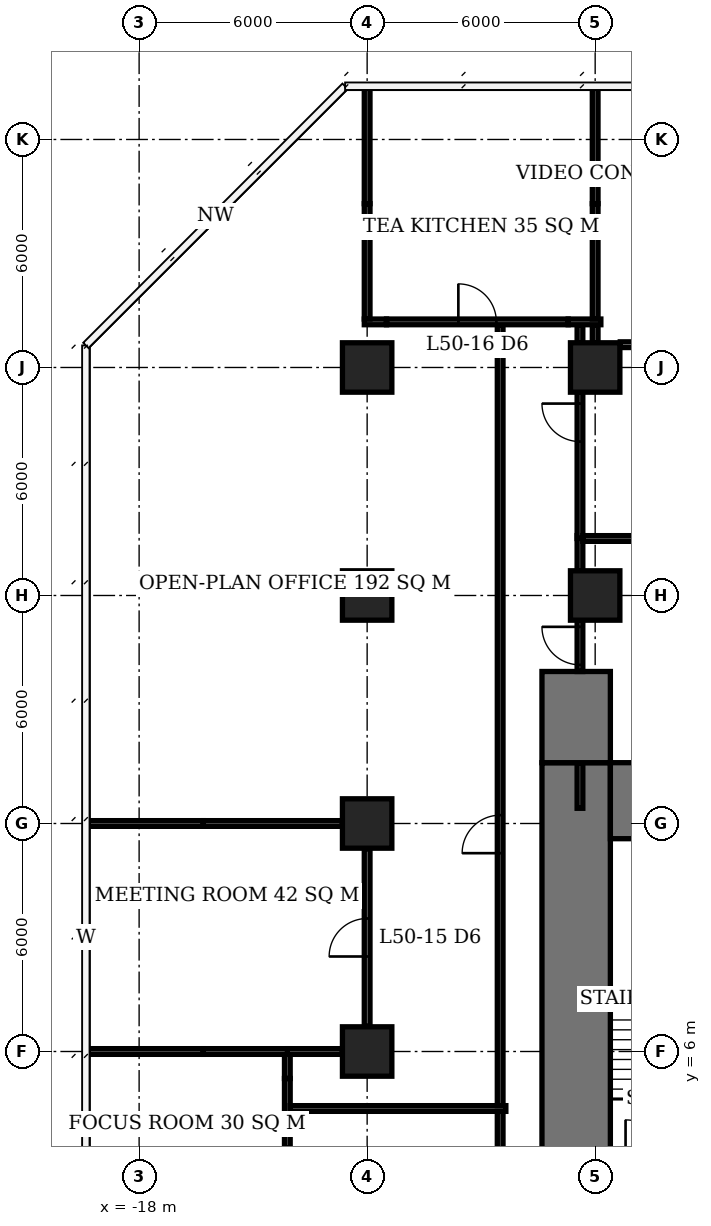
"""IFC4 building model, lengths in metres.
Left out: names, types, materials, properties, quantities, classifications, styles, units other than length and angle.
Written with IfcOpenShell. Run it as: python <this file> out.ifc"""

import sys

from ifc_helpers import new_model, si_unit, direction, frame, frame_2d, origin, origin_2d, place, context, subcontext, project, spatial, rectangle, extrude, element, fill, save


model = new_model("IFC4")
c1 = context("Model", 3, precision=1e-05, world=origin(), true_north=direction((0.0, 1.0)))
c2 = subcontext(c1, "Body", "Model", "MODEL_VIEW")
j1 = project(units=[si_unit("LENGTHUNIT", "METRE"), si_unit("PLANEANGLEUNIT", "RADIAN")], contexts=[c1])
p1 = place(None, origin())
s1 = spatial("IfcSite", under=j1, at=p1, CompositionType="ELEMENT")
p2 = place(p1, origin())
s2 = spatial("IfcBuilding", under=s1, at=p2, CompositionType="ELEMENT")
p3 = place(p2, frame((0.0, 0.0, 204.5)))
s3 = spatial("IfcBuildingStorey", under=s2, at=p3, CompositionType="ELEMENT", Elevation=204.5)
for number, where, z_axis, x_axis in (
    (1, (-12.0, 6.0, 0.0), (0.0, 0.0, 1.0), (1.0, 0.0, 0.0)),
    (2, (-12.0, 12.0, 0.0), (0.0, 0.0, 1.0), (1.0, 0.0, 0.0)),
    (3, (-12.0, 18.0, 0.0), (0.0, 0.0, 1.0), (1.0, 0.0, 0.0)),
    (4, (-12.0, 24.0, 0.0), (0.0, 0.0, 1.0), (1.0, 0.0, 0.0)),
    (5, (-6.0, 18.0, 0.0), (0.0, 0.0, 1.0), (1.0, 0.0, 0.0)),
    (6, (-6.0, 24.0, 0.0), (0.0, 0.0, 1.0), (1.0, 0.0, 0.0)),
):
    element("IfcColumn", number, at=place(p3, frame(where, z_axis=z_axis, x_axis=x_axis)), inside=s3, PredefinedType="COLUMN", context=c2, shape_type="SweptSolid", body=[
        extrude(rectangle(XDim=1.3, YDim=1.3, at=origin_2d()), origin(), (0.0, 0.0, 1.0), 3.9),
    ])
p4 = place(p3, frame((-5.6, 12.6, 0.0), z_axis=(0.0, 0.0, 1.0), x_axis=(1.0, 0.0, 0.0)))
e7 = element("IfcWall", 7, at=p4, inside=s3, PredefinedType="SHEAR", context=c2, shape_type="SweptSolid", body=[
    extrude(rectangle(XDim=23.2, YDim=2.0, at=frame_2d((11.6, 0.0))), origin(), (0.0, 0.0, 1.0), 3.9),
])
p5 = place(p3, frame((-6.5, -7.6, 0.0), z_axis=(0.0, 0.0, 1.0), x_axis=(0.0, 1.0, 0.0)))
e8 = element("IfcWall", 8, at=p5, inside=s3, PredefinedType="SHEAR", context=c2, shape_type="SweptSolid", body=[
    extrude(rectangle(XDim=21.2, YDim=1.8, at=frame_2d((10.6, 0.0))), origin(), (0.0, 0.0, 1.0), 3.9),
])
p6 = place(p5, frame((7.8, 0.0, 0.0)))
e9 = element("IfcOpeningElement", 9, at=p6, cuts=e8, PredefinedType="OPENING", context=c2, shape_type="SweptSolid", body=[
    extrude(rectangle(XDim=1.8, YDim=2.4, at=frame_2d((0.9, 1.2))), frame((0.0, 0.91, 0.0), z_axis=(0.0, -1.0, 0.0), x_axis=(1.0, 0.0, 0.0)), (0.0, 0.0, 1.0), 1.82),
])
p7 = place(p3, frame((-6.5, 13.6, 0.0), z_axis=(0.0, 0.0, 1.0), x_axis=(0.0, 1.0, 0.0)))
e10 = element("IfcWall", 10, at=p7, inside=s3, PredefinedType="SHEAR", context=c2, shape_type="SweptSolid", body=[
    extrude(rectangle(XDim=2.4, YDim=1.8, at=frame_2d((1.2, 0.0))), origin(), (0.0, 0.0, 1.0), 3.9),
])
p8 = place(p3, frame((-19.35, 6.0, 0.0), z_axis=(0.0, 0.0, 1.0), x_axis=(1.0, 0.0, 0.0)))
e11 = element("IfcWall", 11, at=p8, inside=s3, PredefinedType="PARTITIONING", context=c2, shape_type="SweptSolid", body=[
    extrude(rectangle(XDim=3.04, YDim=0.15, at=frame_2d((1.52, 0.0))), origin(), (0.0, 0.0, 1.0), 3.65),
])
p9 = place(p3, frame((-16.31, 6.0, 0.0), z_axis=(0.0, 0.0, 1.0), x_axis=(1.0, 0.0, 0.0)))
e12 = element("IfcWall", 12, at=p9, inside=s3, PredefinedType="PARTITIONING", context=c2, shape_type="SweptSolid", body=[
    extrude(rectangle(XDim=2.285, YDim=0.15, at=frame_2d((1.143, 0.0))), origin(), (0.0, 0.0, 1.0), 2.65),
])
p10 = place(p3, frame((-14.1, 6.0, 0.0), z_axis=(0.0, 0.0, 1.0), x_axis=(1.0, 0.0, 0.0)))
e13 = element("IfcWall", 13, at=p10, inside=s3, PredefinedType="PARTITIONING", context=c2, shape_type="SweptSolid", body=[
    extrude(rectangle(XDim=1.45, YDim=0.15, at=frame_2d((0.725, 0.0))), origin(), (0.0, 0.0, 1.0), 2.65),
])
p11 = place(p3, frame((-19.35, 12.0, 0.0), z_axis=(0.0, 0.0, 1.0), x_axis=(1.0, 0.0, 0.0)))
e14 = element("IfcWall", 14, at=p11, inside=s3, PredefinedType="PARTITIONING", context=c2, shape_type="SweptSolid", body=[
    extrude(rectangle(XDim=3.04, YDim=0.15, at=frame_2d((1.52, 0.0))), origin(), (0.0, 0.0, 1.0), 3.65),
])
p12 = place(p3, frame((-16.31, 12.0, 0.0), z_axis=(0.0, 0.0, 1.0), x_axis=(1.0, 0.0, 0.0)))
e15 = element("IfcWall", 15, at=p12, inside=s3, PredefinedType="PARTITIONING", context=c2, shape_type="SweptSolid", body=[
    extrude(rectangle(XDim=3.66, YDim=0.15, at=frame_2d((1.83, 0.0))), origin(), (0.0, 0.0, 1.0), 2.65),
])
p13 = place(p3, frame((-5.34, 24.6, 0.0), z_axis=(0.0, 0.0, 1.0), x_axis=(1.0, 0.0, 0.0)))
e16 = element("IfcWall", 16, at=p13, inside=s3, PredefinedType="PARTITIONING", context=c2, shape_type="SweptSolid", body=[
    extrude(rectangle(XDim=4.68, YDim=0.15, at=frame_2d((2.34, 0.0))), origin(), (0.0, 0.0, 1.0), 3.65),
])
p14 = place(p13, frame((1.84, 0.0, 0.0)))
e17 = element("IfcOpeningElement", 17, at=p14, cuts=e16, PredefinedType="OPENING", context=c2, shape_type="SweptSolid", body=[
    extrude(rectangle(XDim=1.0, YDim=2.1, at=frame_2d((0.5, 1.05))), frame((0.0, 0.085, 0.0), z_axis=(0.0, -1.0, 0.0), x_axis=(1.0, 0.0, 0.0)), (0.0, 0.0, 1.0), 0.17),
])
p15 = place(p3, frame((-12.075, 25.2, 0.0), z_axis=(0.0, 0.0, 1.0), x_axis=(1.0, 0.0, 0.0)))
e18 = element("IfcWall", 18, at=p15, inside=s3, PredefinedType="PARTITIONING", context=c2, shape_type="SweptSolid", body=[
    extrude(rectangle(XDim=0.585, YDim=0.15, at=frame_2d((0.292, 0.0))), origin(), (0.0, 0.0, 1.0), 2.65),
])
p16 = place(p3, frame((-11.49, 25.2, 0.0), z_axis=(0.0, 0.0, 1.0), x_axis=(1.0, 0.0, 0.0)))
e19 = element("IfcWall", 19, at=p16, inside=s3, PredefinedType="PARTITIONING", context=c2, shape_type="SweptSolid", body=[
    extrude(rectangle(XDim=4.78, YDim=0.15, at=frame_2d((2.39, 0.0))), origin(), (0.0, 0.0, 1.0), 3.65),
])
p17 = place(p16, frame((1.89, 0.0, 0.0)))
e20 = element("IfcOpeningElement", 20, at=p17, cuts=e19, PredefinedType="OPENING", context=c2, shape_type="SweptSolid", body=[
    extrude(rectangle(XDim=1.0, YDim=2.1, at=frame_2d((0.5, 1.05))), frame((0.0, 0.085, 0.0), z_axis=(0.0, -1.0, 0.0), x_axis=(1.0, 0.0, 0.0)), (0.0, 0.0, 1.0), 0.17),
])
p18 = place(p3, frame((-6.71, 25.2, 0.0), z_axis=(0.0, 0.0, 1.0), x_axis=(1.0, 0.0, 0.0)))
e21 = element("IfcWall", 21, at=p18, inside=s3, PredefinedType="PARTITIONING", context=c2, shape_type="SweptSolid", body=[
    extrude(rectangle(XDim=0.86, YDim=0.15, at=frame_2d((0.43, 0.0))), origin(), (0.0, 0.0, 1.0), 2.65),
])
p19 = place(p3, frame((-14.1, 0.71, 0.0), z_axis=(0.0, 0.0, 1.0), x_axis=(0.0, 1.0, 0.0)))
e22 = element("IfcWall", 22, at=p19, inside=s3, PredefinedType="PARTITIONING", context=c2, shape_type="SweptSolid", body=[
    extrude(rectangle(XDim=4.58, YDim=0.15, at=frame_2d((2.29, 0.0))), origin(), (0.0, 0.0, 1.0), 3.65),
])
p20 = place(p19, frame((1.79, 0.0, 0.0)))
e23 = element("IfcOpeningElement", 23, at=p20, cuts=e22, PredefinedType="OPENING", context=c2, shape_type="SweptSolid", body=[
    extrude(rectangle(XDim=1.0, YDim=2.1, at=frame_2d((0.5, 1.05))), frame((0.0, 0.085, 0.0), z_axis=(0.0, -1.0, 0.0), x_axis=(1.0, 0.0, 0.0)), (0.0, 0.0, 1.0), 0.17),
])
p21 = place(p3, frame((-14.1, 5.29, 0.0), z_axis=(0.0, 0.0, 1.0), x_axis=(0.0, 1.0, 0.0)))
e24 = element("IfcWall", 24, at=p21, inside=s3, PredefinedType="PARTITIONING", context=c2, shape_type="SweptSolid", body=[
    extrude(rectangle(XDim=0.635, YDim=0.15, at=frame_2d((0.317, 0.0))), origin(), (0.0, 0.0, 1.0), 2.65),
])
p22 = place(p3, frame((-12.0, 6.66, 0.0), z_axis=(0.0, 0.0, 1.0), x_axis=(0.0, 1.0, 0.0)))
e25 = element("IfcWall", 25, at=p22, inside=s3, PredefinedType="PARTITIONING", context=c2, shape_type="SweptSolid", body=[
    extrude(rectangle(XDim=4.68, YDim=0.15, at=frame_2d((2.34, 0.0))), origin(), (0.0, 0.0, 1.0), 3.65),
])
p23 = place(p22, frame((1.84, 0.0, 0.0)))
e26 = element("IfcOpeningElement", 26, at=p23, cuts=e25, PredefinedType="OPENING", context=c2, shape_type="SweptSolid", body=[
    extrude(rectangle(XDim=1.0, YDim=2.1, at=frame_2d((0.5, 1.05))), frame((0.0, 0.085, 0.0), z_axis=(0.0, -1.0, 0.0), x_axis=(1.0, 0.0, 0.0)), (0.0, 0.0, 1.0), 0.17),
])
p24 = place(p3, frame((-12.0, 25.275, 0.0), z_axis=(0.0, 0.0, 1.0), x_axis=(0.0, 1.0, 0.0)))
e27 = element("IfcWall", 27, at=p24, inside=s3, PredefinedType="PARTITIONING", context=c2, shape_type="SweptSolid", body=[
    extrude(rectangle(XDim=3.035, YDim=0.15, at=frame_2d((1.518, 0.0))), origin(), (0.0, 0.0, 1.0), 2.65),
])
p25 = place(p3, frame((-12.0, 28.31, 0.0), z_axis=(0.0, 0.0, 1.0), x_axis=(0.0, 1.0, 0.0)))
e28 = element("IfcWall", 28, at=p25, inside=s3, PredefinedType="PARTITIONING", context=c2, shape_type="SweptSolid", body=[
    extrude(rectangle(XDim=3.09, YDim=0.15, at=frame_2d((1.545, 0.0))), origin(), (0.0, 0.0, 1.0), 3.65),
])
p26 = place(p3, frame((-6.0, 24.65, 0.0), z_axis=(0.0, 0.0, 1.0), x_axis=(0.0, 1.0, 0.0)))
e29 = element("IfcWall", 29, at=p26, inside=s3, PredefinedType="PARTITIONING", context=c2, shape_type="SweptSolid", body=[
    extrude(rectangle(XDim=0.475, YDim=0.15, at=frame_2d((0.238, 0.0))), origin(), (0.0, 0.0, 1.0), 2.65),
])
p27 = place(p3, frame((-6.0, 25.275, 0.0), z_axis=(0.0, 0.0, 1.0), x_axis=(0.0, 1.0, 0.0)))
e30 = element("IfcWall", 30, at=p27, inside=s3, PredefinedType="PARTITIONING", context=c2, shape_type="SweptSolid", body=[
    extrude(rectangle(XDim=3.035, YDim=0.15, at=frame_2d((1.518, 0.0))), origin(), (0.0, 0.0, 1.0), 2.65),
])
p28 = place(p3, frame((-6.0, 28.31, 0.0), z_axis=(0.0, 0.0, 1.0), x_axis=(0.0, 1.0, 0.0)))
e31 = element("IfcWall", 31, at=p28, inside=s3, PredefinedType="PARTITIONING", context=c2, shape_type="SweptSolid", body=[
    extrude(rectangle(XDim=3.09, YDim=0.15, at=frame_2d((1.545, 0.0))), origin(), (0.0, 0.0, 1.0), 3.65),
])
p29 = place(p3, frame((-14.025, 4.5, 0.0), z_axis=(0.0, 0.0, 1.0), x_axis=(1.0, 0.0, 0.0)))
e32 = element("IfcWall", 32, at=p29, inside=s3, PredefinedType="PARTITIONING", context=c2, shape_type="SweptSolid", body=[
    extrude(rectangle(XDim=5.675, YDim=0.15, at=frame_2d((2.837, 0.0))), origin(), (0.0, 0.0, 1.0), 3.65),
])
p30 = place(p3, frame((-8.5, -13.4, 0.0), z_axis=(0.0, 0.0, 1.0), x_axis=(0.0, 1.0, 0.0)))
e33 = element("IfcWall", 33, at=p30, inside=s3, PredefinedType="PARTITIONING", context=c2, shape_type="SweptSolid", body=[
    extrude(rectangle(XDim=17.825, YDim=0.15, at=frame_2d((8.913, 0.0))), origin(), (0.0, 0.0, 1.0), 3.65),
])
p31 = place(p30, frame((11.17, 0.0, 0.0)))
e34 = element("IfcOpeningElement", 34, at=p31, cuts=e33, PredefinedType="OPENING", context=c2, shape_type="SweptSolid", body=[
    extrude(rectangle(XDim=1.0, YDim=2.1, at=frame_2d((0.5, 1.05))), frame((0.0, 0.085, 0.0), z_axis=(0.0, -1.0, 0.0), x_axis=(1.0, 0.0, 0.0)), (0.0, 0.0, 1.0), 0.17),
])
p32 = place(p3, frame((-8.5, 4.575, 0.0), z_axis=(0.0, 0.0, 1.0), x_axis=(0.0, 1.0, 0.0)))
e35 = element("IfcWall", 35, at=p32, inside=s3, PredefinedType="PARTITIONING", context=c2, shape_type="SweptSolid", body=[
    extrude(rectangle(XDim=20.55, YDim=0.15, at=frame_2d((10.275, 0.0))), origin(), (0.0, 0.0, 1.0), 3.65),
])
p33 = place(p32, frame((6.644, 0.0, 0.0)))
e36 = element("IfcOpeningElement", 36, at=p33, cuts=e35, PredefinedType="OPENING", context=c2, shape_type="SweptSolid", body=[
    extrude(rectangle(XDim=1.0, YDim=2.1, at=frame_2d((0.5, 1.05))), frame((0.0, 0.085, 0.0), z_axis=(0.0, -1.0, 0.0), x_axis=(1.0, 0.0, 0.0)), (0.0, 0.0, 1.0), 0.17),
])
p34 = place(p3, frame((-6.4, 12.4, 0.0), z_axis=(0.0, 0.0, 1.0), x_axis=(0.0, 1.0, 0.0)))
e37 = element("IfcWall", 37, at=p34, inside=s3, PredefinedType="PARTITIONING", context=c2, shape_type="SweptSolid", body=[
    extrude(rectangle(XDim=1.2, YDim=0.15, at=frame_2d((0.6, 0.0))), origin(), (0.0, 0.0, 1.0), 3.65),
])
p35 = place(p3, frame((-6.4, 16.0, 0.0), z_axis=(0.0, 0.0, 1.0), x_axis=(0.0, 1.0, 0.0)))
e38 = element("IfcWall", 38, at=p35, inside=s3, PredefinedType="PARTITIONING", context=c2, shape_type="SweptSolid", body=[
    extrude(rectangle(XDim=1.35, YDim=0.15, at=frame_2d((0.675, 0.0))), origin(), (0.0, 0.0, 1.0), 3.65),
])
p36 = place(p35, frame((0.175, 0.0, 0.0)))
e39 = element("IfcOpeningElement", 39, at=p36, cuts=e38, PredefinedType="OPENING", context=c2, shape_type="SweptSolid", body=[
    extrude(rectangle(XDim=1.0, YDim=2.1, at=frame_2d((0.5, 1.05))), frame((0.0, 0.085, 0.0), z_axis=(0.0, -1.0, 0.0), x_axis=(1.0, 0.0, 0.0)), (0.0, 0.0, 1.0), 0.17),
])
p37 = place(p3, frame((-6.4, 18.65, 0.0), z_axis=(0.0, 0.0, 1.0), x_axis=(0.0, 1.0, 0.0)))
e40 = element("IfcWall", 40, at=p37, inside=s3, PredefinedType="PARTITIONING", context=c2, shape_type="SweptSolid", body=[
    extrude(rectangle(XDim=0.925, YDim=0.15, at=frame_2d((0.462, 0.0))), origin(), (0.0, 0.0, 1.0), 3.65),
])
p38 = place(p3, frame((-6.4, 19.5, 0.0), z_axis=(0.0, 0.0, 1.0), x_axis=(0.0, 1.0, 0.0)))
e41 = element("IfcWall", 41, at=p38, inside=s3, PredefinedType="PARTITIONING", context=c2, shape_type="SweptSolid", body=[
    extrude(rectangle(XDim=3.85, YDim=0.15, at=frame_2d((1.925, 0.0))), origin(), (0.0, 0.0, 1.0), 3.65),
])
p39 = place(p38, frame((2.55, 0.0, 0.0)))
e42 = element("IfcOpeningElement", 42, at=p39, cuts=e41, PredefinedType="OPENING", context=c2, shape_type="SweptSolid", body=[
    extrude(rectangle(XDim=1.0, YDim=2.1, at=frame_2d((0.5, 1.05))), frame((0.0, 0.085, 0.0), z_axis=(0.0, -1.0, 0.0), x_axis=(1.0, 0.0, 0.0)), (0.0, 0.0, 1.0), 0.17),
])
p40 = place(p3, frame((-6.4, 24.65, 0.0), z_axis=(0.0, 0.0, 1.0), x_axis=(0.0, 1.0, 0.0)))
e43 = element("IfcWall", 43, at=p40, inside=s3, PredefinedType="PARTITIONING", context=c2, shape_type="SweptSolid", body=[
    extrude(rectangle(XDim=0.475, YDim=0.15, at=frame_2d((0.238, 0.0))), origin(), (0.0, 0.0, 1.0), 2.65),
])
p41 = place(p3, frame((-6.325, 19.5, 0.0), z_axis=(0.0, 0.0, 1.0), x_axis=(1.0, 0.0, 0.0)))
e44 = element("IfcWall", 44, at=p41, inside=s3, PredefinedType="PARTITIONING", context=c2, shape_type="SweptSolid", body=[
    extrude(rectangle(XDim=16.975, YDim=0.15, at=frame_2d((8.487, 0.0))), origin(), (0.0, 0.0, 1.0), 3.65),
])
p42 = place(p23, origin())
e45 = element("IfcDoor", 45, at=p42, inside=s3, OperationType="SINGLE_SWING_LEFT", PredefinedType="DOOR", context=c2, shape_type="SweptSolid", body=[
    extrude(rectangle(XDim=1.0, YDim=2.1, at=frame_2d((0.5, 1.05))), frame((0.0, 0.025, 0.0), z_axis=(0.0, -1.0, 0.0), x_axis=(1.0, 0.0, 0.0)), (0.0, 0.0, 1.0), 0.05),
])
fill(e26, e45)
p43 = place(p17, origin())
e46 = element("IfcDoor", 46, at=p43, inside=s3, OperationType="SINGLE_SWING_LEFT", PredefinedType="DOOR", context=c2, shape_type="SweptSolid", body=[
    extrude(rectangle(XDim=1.0, YDim=2.1, at=frame_2d((0.5, 1.05))), frame((0.0, 0.025, 0.0), z_axis=(0.0, -1.0, 0.0), x_axis=(1.0, 0.0, 0.0)), (0.0, 0.0, 1.0), 0.05),
])
fill(e20, e46)
p44 = place(p33, origin())
e47 = element("IfcDoor", 47, at=p44, inside=s3, OperationType="SINGLE_SWING_LEFT", PredefinedType="DOOR", context=c2, shape_type="SweptSolid", body=[
    extrude(rectangle(XDim=1.0, YDim=2.1, at=frame_2d((0.5, 1.05))), frame((0.0, 0.025, 0.0), z_axis=(0.0, -1.0, 0.0), x_axis=(1.0, 0.0, 0.0)), (0.0, 0.0, 1.0), 0.05),
])
fill(e36, e47)
p45 = place(p39, origin())
e48 = element("IfcDoor", 48, at=p45, inside=s3, OperationType="SINGLE_SWING_RIGHT", PredefinedType="DOOR", context=c2, shape_type="SweptSolid", body=[
    extrude(rectangle(XDim=1.0, YDim=2.1, at=frame_2d((0.5, 1.05))), frame((0.0, 0.025, 0.0), z_axis=(0.0, -1.0, 0.0), x_axis=(1.0, 0.0, 0.0)), (0.0, 0.0, 1.0), 0.05),
])
fill(e42, e48)
p46 = place(p36, origin())
e49 = element("IfcDoor", 49, at=p46, inside=s3, OperationType="SINGLE_SWING_RIGHT", PredefinedType="DOOR", context=c2, shape_type="SweptSolid", body=[
    extrude(rectangle(XDim=1.0, YDim=2.1, at=frame_2d((0.5, 1.05))), frame((0.0, 0.025, 0.0), z_axis=(0.0, -1.0, 0.0), x_axis=(1.0, 0.0, 0.0)), (0.0, 0.0, 1.0), 0.05),
])
fill(e39, e49)
save(model, sys.argv[1])
